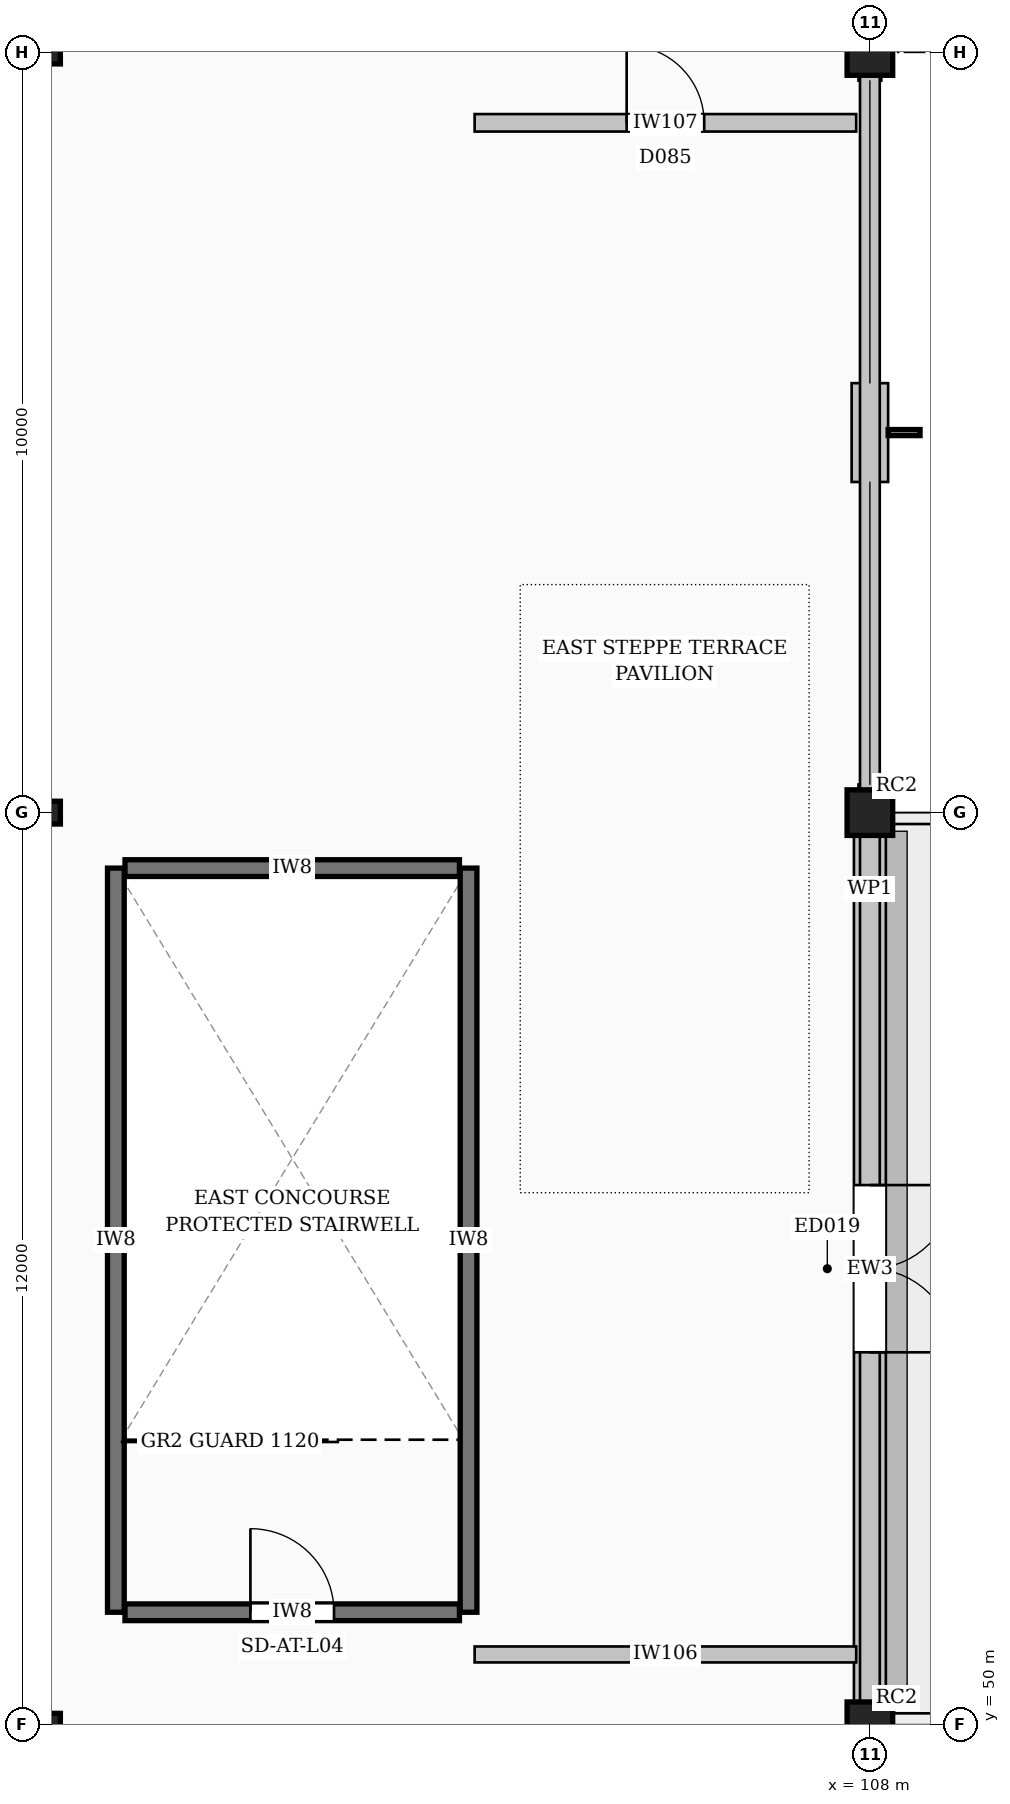
"""IFC4 building model, lengths in metres.
Left out: names, types, materials, properties, quantities, classifications, styles, units other than length and angle.
Written with IfcOpenShell. Run it as: python <this file> out.ifc"""

import sys

from ifc_helpers import new_model, si_unit, direction, frame, frame_2d, origin, origin_2d, place, context, subcontext, project, spatial, rectangle, hollow_rectangle, extrude, element, fill, save


model = new_model("IFC4")
c1 = context("Model", 3, precision=1e-05, world=origin(), true_north=direction((0.0, 1.0)))
c2 = subcontext(c1, "Body", "Model", "MODEL_VIEW")
j1 = project(units=[si_unit("LENGTHUNIT", "METRE"), si_unit("PLANEANGLEUNIT", "RADIAN")], contexts=[c1])
p1 = place(None, origin())
s1 = spatial("IfcSite", under=j1, at=p1, CompositionType="ELEMENT")
p2 = place(p1, origin())
s2 = spatial("IfcBuilding", under=s1, at=p2, CompositionType="ELEMENT")
p3 = place(p2, frame((0.0, 0.0, 24.0)))
s3 = spatial("IfcBuildingStorey", under=s2, at=p3, CompositionType="ELEMENT", Elevation=24.0)
for number, where, z_axis, x_axis in (
    (1, (97.2, 50.0, 0.0), (0.0, 0.0, 1.0), (1.0, 0.0, 0.0)),
    (2, (97.2, 62.0, 0.0), (0.0, 0.0, 1.0), (1.0, 0.0, 0.0)),
    (3, (97.2, 72.0, 0.0), (0.0, 0.0, 1.0), (1.0, 0.0, 0.0)),
):
    element("IfcColumn", number, at=place(p3, frame(where, z_axis=z_axis, x_axis=x_axis)), inside=s3, PredefinedType="COLUMN", context=c2, shape_type="SweptSolid", body=[
        extrude(hollow_rectangle(XDim=0.3, YDim=0.3, WallThickness=0.016, InnerFilletRadius=0.016, OuterFilletRadius=0.032, at=origin_2d()), origin(), (0.0, 0.0, 1.0), 4.8),
    ])
for number, where, z_axis, x_axis in (
    (4, (108.0, 50.0, 0.0), (0.0, 0.0, 1.0), (1.0, 0.0, 0.0)),
    (5, (108.0, 62.0, 0.0), (0.0, 0.0, 1.0), (1.0, 0.0, 0.0)),
    (6, (108.0, 72.0, 0.0), (0.0, 0.0, 1.0), (1.0, 0.0, 0.0)),
):
    element("IfcColumn", number, at=place(p3, frame(where, z_axis=z_axis, x_axis=x_axis)), inside=s3, PredefinedType="COLUMN", context=c2, shape_type="SweptSolid", body=[
        extrude(rectangle(XDim=0.6, YDim=0.6, at=origin_2d()), origin(), (0.0, 0.0, 1.0), 4.8),
    ])
p4 = place(p3, frame((108.0, 50.145, 0.0), z_axis=(0.0, 0.0, 1.0), x_axis=(0.0, 1.0, 0.0)))
e7 = element("IfcWall", 7, at=p4, inside=s3, PredefinedType="STANDARD", context=c2, shape_type="SweptSolid", body=[
    extrude(rectangle(XDim=11.71, YDim=0.42, at=frame_2d((5.855, 0.0))), origin(), (0.0, 0.0, 1.0), 4.109),
])
p5 = place(p4, frame((4.755, 0.0, 0.0)))
e8 = element("IfcOpeningElement", 8, at=p5, cuts=e7, PredefinedType="OPENING", context=c2, shape_type="SweptSolid", body=[
    extrude(rectangle(XDim=2.2, YDim=2.4, at=frame_2d((1.1, 1.2))), frame((0.0, 0.22, 0.0), z_axis=(0.0, -1.0, 0.0), x_axis=(1.0, 0.0, 0.0)), (0.0, 0.0, 1.0), 0.44),
])
p6 = place(p3, frame((108.0, 66.35, 0.0), z_axis=(0.0, 0.0, 1.0), x_axis=(0.0, 1.0, 0.0)))
e9 = element("IfcWall", 9, at=p6, inside=s3, PredefinedType="STANDARD", context=c2, shape_type="SweptSolid", body=[
    extrude(rectangle(XDim=1.3, YDim=0.48, at=frame_2d((0.65, 0.0))), origin(), (0.0, 0.0, 1.0), 4.109),
])
for number, where, z_axis, x_axis in (
    (10, (108.0, 62.145, 0.0), (0.0, 0.0, 1.0), (0.0, 1.0, 0.0)),
    (11, (108.0, 71.63, 0.0), (0.0, 0.0, 1.0), (0.0, 1.0, 0.0)),
):
    element("IfcWall", number, at=place(p3, frame(where, z_axis=z_axis, x_axis=x_axis)), inside=s3, PredefinedType="STANDARD", context=c2, shape_type="SweptSolid", body=[
        extrude(rectangle(XDim=0.225, YDim=0.3, at=frame_2d((0.113, 0.0))), origin(), (0.0, 0.0, 1.0), 4.56),
    ])
p7 = place(p3, frame((108.0, 40.35, 4.6), z_axis=(0.0, 0.0, 1.0), x_axis=(0.0, 1.0, 0.0)))
e12 = element("IfcWall", 12, at=p7, inside=s3, PredefinedType="PARAPET", context=c2, shape_type="SweptSolid", body=[
    extrude(rectangle(XDim=41.3, YDim=0.26, at=frame_2d((20.65, 0.0))), origin(), (0.0, 0.0, 1.0), 0.55),
])
for number, where, z_axis, x_axis in (
    (13, (98.08, 51.48, 0.0), (0.0, 0.0, 1.0), (0.0, 1.0, 0.0)),
    (14, (102.72, 51.48, 0.0), (0.0, 0.0, 1.0), (0.0, 1.0, 0.0)),
):
    element("IfcWall", number, at=place(p3, frame(where, z_axis=z_axis, x_axis=x_axis)), inside=s3, PredefinedType="SHEAR", context=c2, shape_type="SweptSolid", body=[
        extrude(rectangle(XDim=9.79, YDim=0.22, at=frame_2d((4.895, 0.0))), origin(), (0.0, 0.0, 1.0), 4.56),
    ])
p8 = place(p3, frame((98.2, 61.27, 0.0), z_axis=(0.0, 0.0, 1.0), x_axis=(1.0, 0.0, 0.0)))
e15 = element("IfcWall", 15, at=p8, inside=s3, PredefinedType="SHEAR", context=c2, shape_type="SweptSolid", body=[
    extrude(rectangle(XDim=4.4, YDim=0.22, at=frame_2d((2.2, 0.0))), origin(), (0.0, 0.0, 1.0), 4.56),
])
p9 = place(p3, frame((98.2, 51.48, 0.0), z_axis=(0.0, 0.0, 1.0), x_axis=(1.0, 0.0, 0.0)))
e16 = element("IfcWall", 16, at=p9, inside=s3, PredefinedType="SHEAR", context=c2, shape_type="SweptSolid", body=[
    extrude(rectangle(XDim=4.4, YDim=0.22, at=frame_2d((2.2, 0.0))), origin(), (0.0, 0.0, 1.0), 4.56),
])
p10 = place(p9, frame((1.65, 0.0, 0.0)))
e17 = element("IfcOpeningElement", 17, at=p10, cuts=e16, PredefinedType="OPENING", context=c2, shape_type="SweptSolid", body=[
    extrude(rectangle(XDim=1.1, YDim=2.2, at=frame_2d((0.55, 1.1))), frame((0.0, 0.12, 0.0), z_axis=(0.0, -1.0, 0.0), x_axis=(1.0, 0.0, 0.0)), (0.0, 0.0, 1.0), 0.24),
])
p11 = place(p3, frame((102.8, 71.075, 0.0), z_axis=(0.0, 0.0, 1.0), x_axis=(1.0, 0.0, 0.0)))
e18 = element("IfcWall", 18, at=p11, inside=s3, PredefinedType="PARTITIONING", context=c2, shape_type="SweptSolid", body=[
    extrude(rectangle(XDim=5.02, YDim=0.23, at=frame_2d((2.51, 0.0))), origin(), (0.0, 0.0, 1.0), 4.52),
])
p12 = place(p11, frame((2.0, 0.0, 0.0)))
e19 = element("IfcOpeningElement", 19, at=p12, cuts=e18, PredefinedType="OPENING", context=c2, shape_type="SweptSolid", body=[
    extrude(rectangle(XDim=1.02, YDim=2.1, at=frame_2d((0.51, 1.05))), frame((0.0, 0.125, 0.0), z_axis=(0.0, -1.0, 0.0), x_axis=(1.0, 0.0, 0.0)), (0.0, 0.0, 1.0), 0.25),
])
p13 = place(p3, frame((102.8, 50.925, 0.0), z_axis=(0.0, 0.0, 1.0), x_axis=(1.0, 0.0, 0.0)))
e20 = element("IfcWall", 20, at=p13, inside=s3, PredefinedType="PARTITIONING", context=c2, shape_type="SweptSolid", body=[
    extrude(rectangle(XDim=5.02, YDim=0.21, at=frame_2d((2.51, 0.0))), origin(), (0.0, 0.0, 1.0), 4.52),
])
p14 = place(p5, frame((2.2, 0.0, 0.0), z_axis=(0.0, 0.0, 1.0), x_axis=(-1.0, 0.0, 0.0)))
e21 = element("IfcDoor", 21, at=p14, inside=s3, OperationType="DOUBLE_DOOR_SINGLE_SWING", PredefinedType="DOOR", context=c2, shape_type="SweptSolid", body=[
    extrude(rectangle(XDim=2.2, YDim=2.4, at=frame_2d((1.1, 1.2))), frame((0.0, 0.025, 0.0), z_axis=(0.0, -1.0, 0.0), x_axis=(1.0, 0.0, 0.0)), (0.0, 0.0, 1.0), 0.05),
])
fill(e8, e21)
p15 = place(p10, origin())
e22 = element("IfcDoor", 22, at=p15, inside=s3, OperationType="SINGLE_SWING_LEFT", PredefinedType="DOOR", context=c2, shape_type="SweptSolid", body=[
    extrude(rectangle(XDim=1.1, YDim=2.2, at=frame_2d((0.55, 1.1))), frame((0.0, 0.025, 0.0), z_axis=(0.0, -1.0, 0.0), x_axis=(1.0, 0.0, 0.0)), (0.0, 0.0, 1.0), 0.05),
])
fill(e17, e22)
p16 = place(p12, origin())
e23 = element("IfcDoor", 23, at=p16, inside=s3, OperationType="SINGLE_SWING_LEFT", PredefinedType="DOOR", context=c2, shape_type="SweptSolid", body=[
    extrude(rectangle(XDim=1.02, YDim=2.1, at=frame_2d((0.51, 1.05))), frame((0.0, 0.025, 0.0), z_axis=(0.0, -1.0, 0.0), x_axis=(1.0, 0.0, 0.0)), (0.0, 0.0, 1.0), 0.05),
])
fill(e19, e23)
save(model, sys.argv[1])
